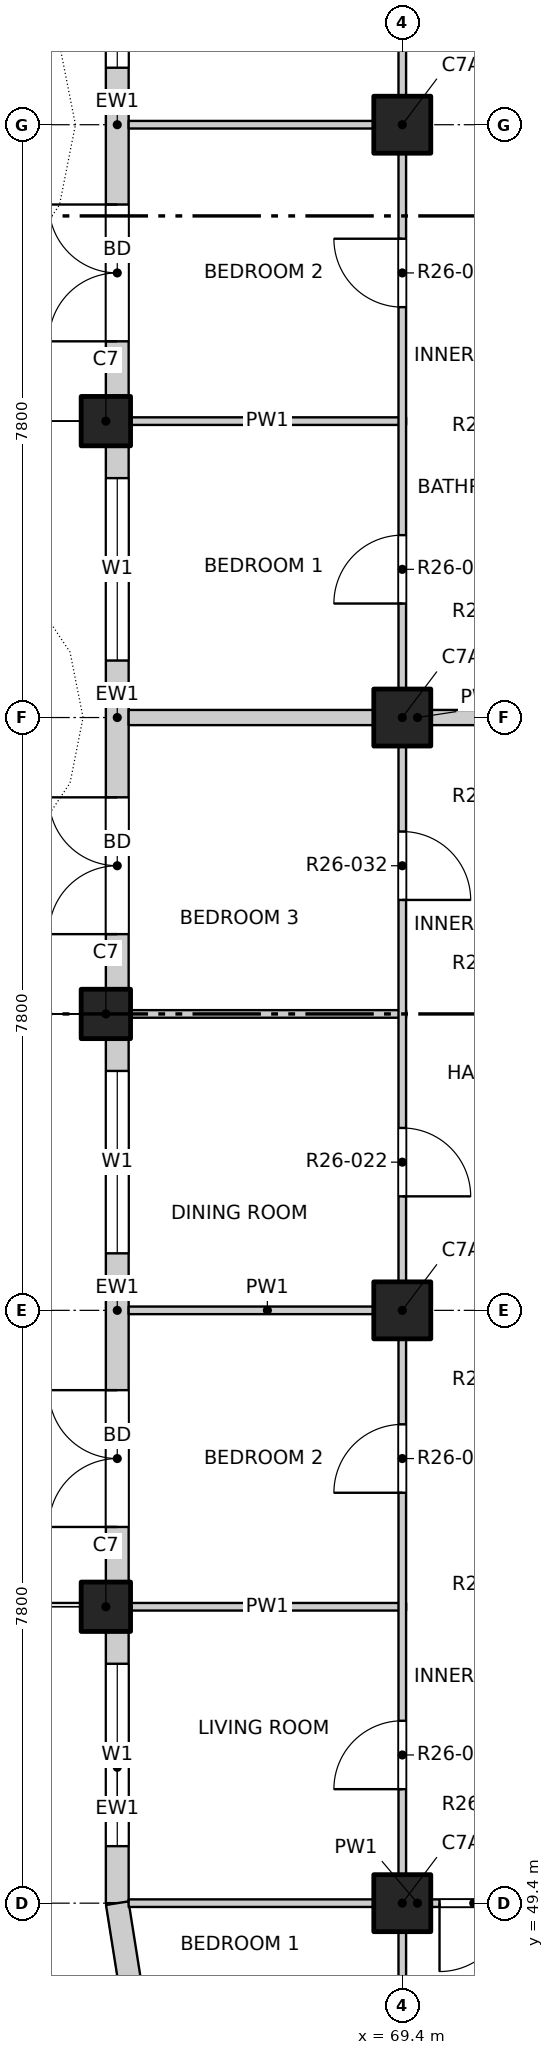
"""IFC4 building model, lengths in metres.
Left out: names, types, materials, properties, quantities, classifications, styles, units other than length and angle.
Written with IfcOpenShell. Run it as: python <this file> out.ifc"""

import sys

from ifc_helpers import new_model, si_unit, direction, frame, frame_2d, origin, origin_2d, place, context, subcontext, project, spatial, rectangle, extrude, element, fill, save


model = new_model("IFC4")
c1 = context("Model", 3, precision=1e-05, world=origin(), true_north=direction((0.0, 1.0)))
c2 = subcontext(c1, "Body", "Model", "MODEL_VIEW")
j1 = project(units=[si_unit("LENGTHUNIT", "METRE"), si_unit("PLANEANGLEUNIT", "RADIAN")], contexts=[c1])
p1 = place(None, origin())
s1 = spatial("IfcSite", under=j1, at=p1, CompositionType="ELEMENT")
p2 = place(p1, origin())
s2 = spatial("IfcBuilding", under=s1, at=p2, CompositionType="ELEMENT")
p3 = place(p2, frame((0.0, 0.0, 259.6)))
s3 = spatial("IfcBuildingStorey", under=s2, at=p3, CompositionType="ELEMENT", Elevation=259.6)
for number, where, z_axis, x_axis in (
    (1, (65.5, 53.3, -0.25), (0.0, 0.0, 1.0), (1.0, 0.0, 0.0)),
    (2, (65.5, 61.1, -0.25), (0.0, 0.0, 1.0), (1.0, 0.0, 0.0)),
    (3, (65.5, 68.9, -0.25), (0.0, 0.0, 1.0), (1.0, 0.0, 0.0)),
):
    element("IfcColumn", number, at=place(p3, frame(where, z_axis=z_axis, x_axis=x_axis)), inside=s3, PredefinedType="COLUMN", context=c2, shape_type="SweptSolid", body=[
        extrude(rectangle(XDim=0.65, YDim=0.65, at=origin_2d()), origin(), (0.0, 0.0, 1.0), 3.4),
    ])
for number, where, z_axis, x_axis in (
    (4, (69.4, 49.4, -0.25), (0.0, 0.0, 1.0), (1.0, 0.0, 0.0)),
    (5, (69.4, 57.2, -0.25), (0.0, 0.0, 1.0), (1.0, 0.0, 0.0)),
    (6, (69.4, 65.0, -0.25), (0.0, 0.0, 1.0), (1.0, 0.0, 0.0)),
    (7, (69.4, 72.8, -0.25), (0.0, 0.0, 1.0), (1.0, 0.0, 0.0)),
):
    element("IfcColumn", number, at=place(p3, frame(where, z_axis=z_axis, x_axis=x_axis)), inside=s3, PredefinedType="COLUMN", context=c2, shape_type="SweptSolid", body=[
        extrude(rectangle(XDim=0.75, YDim=0.75, at=origin_2d()), origin(), (0.0, 0.0, 1.0), 3.4),
    ])
p4 = place(p3, frame((65.65, 49.4, 0.0), z_axis=(0.0, 0.0, 1.0), x_axis=(0.0, 1.0, 0.0)))
e8 = element("IfcWall", 8, at=p4, inside=s3, PredefinedType="SOLIDWALL", context=c2, shape_type="SweptSolid", body=[
    extrude(rectangle(XDim=3.575, YDim=0.3, at=frame_2d((1.788, 0.0))), origin(), (0.0, 0.0, 1.0), 3.15),
])
p5 = place(p4, frame((0.75, 0.0, 0.9)))
e9 = element("IfcOpeningElement", 9, at=p5, cuts=e8, PredefinedType="OPENING", context=c2, shape_type="SweptSolid", body=[
    extrude(rectangle(XDim=2.4, YDim=1.8, at=frame_2d((1.2, 0.9))), frame((0.0, 0.16, 0.0), z_axis=(0.0, -1.0, 0.0), x_axis=(1.0, 0.0, 0.0)), (0.0, 0.0, 1.0), 0.32),
])
p6 = place(p3, frame((65.65, 53.625, 0.0), z_axis=(0.0, 0.0, 1.0), x_axis=(0.0, 1.0, 0.0)))
e10 = element("IfcWall", 10, at=p6, inside=s3, PredefinedType="SOLIDWALL", context=c2, shape_type="SweptSolid", body=[
    extrude(rectangle(XDim=7.15, YDim=0.3, at=frame_2d((3.575, 0.0))), origin(), (0.0, 0.0, 1.0), 3.15),
])
p7 = place(p6, frame((0.725, 0.0, 0.0)))
e11 = element("IfcOpeningElement", 11, at=p7, cuts=e10, PredefinedType="OPENING", context=c2, shape_type="SweptSolid", body=[
    extrude(rectangle(XDim=1.8, YDim=2.4, at=frame_2d((0.9, 1.2))), frame((0.0, 0.16, 0.0), z_axis=(0.0, -1.0, 0.0), x_axis=(1.0, 0.0, 0.0)), (0.0, 0.0, 1.0), 0.32),
])
p8 = place(p6, frame((4.325, 0.0, 0.9)))
e12 = element("IfcOpeningElement", 12, at=p8, cuts=e10, PredefinedType="OPENING", context=c2, shape_type="SweptSolid", body=[
    extrude(rectangle(XDim=2.4, YDim=1.8, at=frame_2d((1.2, 0.9))), frame((0.0, 0.16, 0.0), z_axis=(0.0, -1.0, 0.0), x_axis=(1.0, 0.0, 0.0)), (0.0, 0.0, 1.0), 0.32),
])
p9 = place(p3, frame((65.65, 61.425, 0.0), z_axis=(0.0, 0.0, 1.0), x_axis=(0.0, 1.0, 0.0)))
e13 = element("IfcWall", 13, at=p9, inside=s3, PredefinedType="SOLIDWALL", context=c2, shape_type="SweptSolid", body=[
    extrude(rectangle(XDim=7.15, YDim=0.3, at=frame_2d((3.575, 0.0))), origin(), (0.0, 0.0, 1.0), 3.15),
])
p10 = place(p9, frame((0.725, 0.0, 0.0)))
e14 = element("IfcOpeningElement", 14, at=p10, cuts=e13, PredefinedType="OPENING", context=c2, shape_type="SweptSolid", body=[
    extrude(rectangle(XDim=1.8, YDim=2.4, at=frame_2d((0.9, 1.2))), frame((0.0, 0.16, 0.0), z_axis=(0.0, -1.0, 0.0), x_axis=(1.0, 0.0, 0.0)), (0.0, 0.0, 1.0), 0.32),
])
p11 = place(p9, frame((4.325, 0.0, 0.9)))
e15 = element("IfcOpeningElement", 15, at=p11, cuts=e13, PredefinedType="OPENING", context=c2, shape_type="SweptSolid", body=[
    extrude(rectangle(XDim=2.4, YDim=1.8, at=frame_2d((1.2, 0.9))), frame((0.0, 0.16, 0.0), z_axis=(0.0, -1.0, 0.0), x_axis=(1.0, 0.0, 0.0)), (0.0, 0.0, 1.0), 0.32),
])
p12 = place(p3, frame((65.65, 69.225, 0.0), z_axis=(0.0, 0.0, 1.0), x_axis=(0.0, 1.0, 0.0)))
e16 = element("IfcWall", 16, at=p12, inside=s3, PredefinedType="SOLIDWALL", context=c2, shape_type="SweptSolid", body=[
    extrude(rectangle(XDim=7.15, YDim=0.3, at=frame_2d((3.575, 0.0))), origin(), (0.0, 0.0, 1.0), 3.15),
])
p13 = place(p12, frame((0.725, 0.0, 0.0)))
e17 = element("IfcOpeningElement", 17, at=p13, cuts=e16, PredefinedType="OPENING", context=c2, shape_type="SweptSolid", body=[
    extrude(rectangle(XDim=1.8, YDim=2.4, at=frame_2d((0.9, 1.2))), frame((0.0, 0.16, 0.0), z_axis=(0.0, -1.0, 0.0), x_axis=(1.0, 0.0, 0.0)), (0.0, 0.0, 1.0), 0.32),
])
p14 = place(p12, frame((4.325, 0.0, 0.9)))
e18 = element("IfcOpeningElement", 18, at=p14, cuts=e16, PredefinedType="OPENING", context=c2, shape_type="SweptSolid", body=[
    extrude(rectangle(XDim=2.4, YDim=1.8, at=frame_2d((1.2, 0.9))), frame((0.0, 0.16, 0.0), z_axis=(0.0, -1.0, 0.0), x_axis=(1.0, 0.0, 0.0)), (0.0, 0.0, 1.0), 0.32),
])
p15 = place(p3, frame((65.65, 49.4, 0.0), z_axis=(0.0, 0.0, 1.0), x_axis=(0.156496880861, -0.987678452879, 0.0)))
e19 = element("IfcWall", 19, at=p15, inside=s3, PredefinedType="SOLIDWALL", context=c2, shape_type="SweptSolid", body=[
    extrude(rectangle(XDim=1.173, YDim=0.3, at=frame_2d((0.586, 0.0))), origin(), (0.0, 0.0, 1.0), 3.15),
])
p16 = place(p3, frame((65.8, 49.4, 0.0), z_axis=(0.0, 0.0, 1.0), x_axis=(1.0, 0.0, 0.0)))
e20 = element("IfcWall", 20, at=p16, inside=s3, PredefinedType="PARTITIONING", context=c2, shape_type="SweptSolid", body=[
    extrude(rectangle(XDim=7.6, YDim=0.1, at=frame_2d((3.8, 0.0))), origin(), (0.0, 0.0, 1.0), 3.15),
])
p17 = place(p16, frame((4.09, 0.0, 0.0)))
e21 = element("IfcOpeningElement", 21, at=p17, cuts=e20, PredefinedType="OPENING", context=c2, shape_type="SweptSolid", body=[
    extrude(rectangle(XDim=0.9, YDim=2.1, at=frame_2d((0.45, 1.05))), frame((0.0, 0.06, 0.0), z_axis=(0.0, -1.0, 0.0), x_axis=(1.0, 0.0, 0.0)), (0.0, 0.0, 1.0), 0.12),
])
for number, where, z_axis, x_axis in (
    (22, (65.8, 53.3, 0.0), (0.0, 0.0, 1.0), (1.0, 0.0, 0.0)),
    (23, (65.8, 57.2, 0.0), (0.0, 0.0, 1.0), (1.0, 0.0, 0.0)),
    (24, (65.8, 61.1, 0.0), (0.0, 0.0, 1.0), (1.0, 0.0, 0.0)),
):
    element("IfcWall", number, at=place(p3, frame(where, z_axis=z_axis, x_axis=x_axis)), inside=s3, PredefinedType="PARTITIONING", context=c2, shape_type="SweptSolid", body=[
        extrude(rectangle(XDim=3.65, YDim=0.1, at=frame_2d((1.825, 0.0))), origin(), (0.0, 0.0, 1.0), 3.15),
    ])
p18 = place(p3, frame((65.8, 65.0, 0.0), z_axis=(0.0, 0.0, 1.0), x_axis=(1.0, 0.0, 0.0)))
e25 = element("IfcWall", 25, at=p18, inside=s3, PredefinedType="PARTITIONING", context=c2, shape_type="SweptSolid", body=[
    extrude(rectangle(XDim=7.6, YDim=0.2, at=frame_2d((3.8, 0.0))), origin(), (0.0, 0.0, 1.0), 3.15),
])
for number, where, z_axis, x_axis in (
    (26, (65.8, 68.9, 0.0), (0.0, 0.0, 1.0), (1.0, 0.0, 0.0)),
    (27, (65.8, 72.8, 0.0), (0.0, 0.0, 1.0), (1.0, 0.0, 0.0)),
):
    element("IfcWall", number, at=place(p3, frame(where, z_axis=z_axis, x_axis=x_axis)), inside=s3, PredefinedType="PARTITIONING", context=c2, shape_type="SweptSolid", body=[
        extrude(rectangle(XDim=3.65, YDim=0.1, at=frame_2d((1.825, 0.0))), origin(), (0.0, 0.0, 1.0), 3.15),
    ])
p19 = place(p3, frame((69.4, 45.8, 0.0), z_axis=(0.0, 0.0, 1.0), x_axis=(0.0, 1.0, 0.0)))
e28 = element("IfcWall", 28, at=p19, inside=s3, PredefinedType="PARTITIONING", context=c2, shape_type="SweptSolid", body=[
    extrude(rectangle(XDim=38.4, YDim=0.1, at=frame_2d((19.2, 0.0))), origin(), (0.0, 0.0, 1.0), 3.15),
])
p20 = place(p19, frame((1.05, 0.0, 0.0)))
e29 = element("IfcOpeningElement", 29, at=p20, cuts=e28, PredefinedType="OPENING", context=c2, shape_type="SweptSolid", body=[
    extrude(rectangle(XDim=1.2, YDim=2.1, at=frame_2d((0.6, 1.05))), frame((0.0, 0.06, 0.0), z_axis=(0.0, -1.0, 0.0), x_axis=(1.0, 0.0, 0.0)), (0.0, 0.0, 1.0), 0.12),
])
p21 = place(p19, frame((5.1, 0.0, 0.0)))
e30 = element("IfcOpeningElement", 30, at=p21, cuts=e28, PredefinedType="OPENING", context=c2, shape_type="SweptSolid", body=[
    extrude(rectangle(XDim=0.9, YDim=2.1, at=frame_2d((0.45, 1.05))), frame((0.0, 0.06, 0.0), z_axis=(0.0, -1.0, 0.0), x_axis=(1.0, 0.0, 0.0)), (0.0, 0.0, 1.0), 0.12),
])
p22 = place(p19, frame((9.0, 0.0, 0.0)))
e31 = element("IfcOpeningElement", 31, at=p22, cuts=e28, PredefinedType="OPENING", context=c2, shape_type="SweptSolid", body=[
    extrude(rectangle(XDim=0.9, YDim=2.1, at=frame_2d((0.45, 1.05))), frame((0.0, 0.06, 0.0), z_axis=(0.0, -1.0, 0.0), x_axis=(1.0, 0.0, 0.0)), (0.0, 0.0, 1.0), 0.12),
])
p23 = place(p19, frame((12.9, 0.0, 0.0)))
e32 = element("IfcOpeningElement", 32, at=p23, cuts=e28, PredefinedType="OPENING", context=c2, shape_type="SweptSolid", body=[
    extrude(rectangle(XDim=0.9, YDim=2.1, at=frame_2d((0.45, 1.05))), frame((0.0, 0.06, 0.0), z_axis=(0.0, -1.0, 0.0), x_axis=(1.0, 0.0, 0.0)), (0.0, 0.0, 1.0), 0.12),
])
p24 = place(p19, frame((16.8, 0.0, 0.0)))
e33 = element("IfcOpeningElement", 33, at=p24, cuts=e28, PredefinedType="OPENING", context=c2, shape_type="SweptSolid", body=[
    extrude(rectangle(XDim=0.9, YDim=2.1, at=frame_2d((0.45, 1.05))), frame((0.0, 0.06, 0.0), z_axis=(0.0, -1.0, 0.0), x_axis=(1.0, 0.0, 0.0)), (0.0, 0.0, 1.0), 0.12),
])
p25 = place(p19, frame((20.7, 0.0, 0.0)))
e34 = element("IfcOpeningElement", 34, at=p25, cuts=e28, PredefinedType="OPENING", context=c2, shape_type="SweptSolid", body=[
    extrude(rectangle(XDim=0.9, YDim=2.1, at=frame_2d((0.45, 1.05))), frame((0.0, 0.06, 0.0), z_axis=(0.0, -1.0, 0.0), x_axis=(1.0, 0.0, 0.0)), (0.0, 0.0, 1.0), 0.12),
])
p26 = place(p19, frame((24.6, 0.0, 0.0)))
e35 = element("IfcOpeningElement", 35, at=p26, cuts=e28, PredefinedType="OPENING", context=c2, shape_type="SweptSolid", body=[
    extrude(rectangle(XDim=0.9, YDim=2.1, at=frame_2d((0.45, 1.05))), frame((0.0, 0.06, 0.0), z_axis=(0.0, -1.0, 0.0), x_axis=(1.0, 0.0, 0.0)), (0.0, 0.0, 1.0), 0.12),
])
p27 = place(p19, frame((30.3, 0.0, 0.0)))
e36 = element("IfcOpeningElement", 36, at=p27, cuts=e28, PredefinedType="OPENING", context=c2, shape_type="SweptSolid", body=[
    extrude(rectangle(XDim=1.2, YDim=2.1, at=frame_2d((0.6, 1.05))), frame((0.0, 0.06, 0.0), z_axis=(0.0, -1.0, 0.0), x_axis=(1.0, 0.0, 0.0)), (0.0, 0.0, 1.0), 0.12),
])
p28 = place(p19, frame((36.15, 0.0, 0.0)))
e37 = element("IfcOpeningElement", 37, at=p28, cuts=e28, PredefinedType="OPENING", context=c2, shape_type="SweptSolid", body=[
    extrude(rectangle(XDim=1.2, YDim=2.1, at=frame_2d((0.6, 1.05))), frame((0.0, 0.06, 0.0), z_axis=(0.0, -1.0, 0.0), x_axis=(1.0, 0.0, 0.0)), (0.0, 0.0, 1.0), 0.12),
])
p29 = place(p5, origin())
e38 = element("IfcWindow", 38, at=p29, inside=s3, PartitioningType="DOUBLE_PANEL_VERTICAL", PredefinedType="WINDOW", context=c2, shape_type="SweptSolid", body=[
    extrude(rectangle(XDim=2.4, YDim=1.8, at=frame_2d((1.2, 0.9))), frame((0.0, 0.03, 0.0), z_axis=(0.0, -1.0, 0.0), x_axis=(1.0, 0.0, 0.0)), (0.0, 0.0, 1.0), 0.06),
])
fill(e9, e38)
p30 = place(p7, origin())
e39 = element("IfcDoor", 39, at=p30, inside=s3, OperationType="DOUBLE_DOOR_SINGLE_SWING", PredefinedType="DOOR", context=c2, shape_type="SweptSolid", body=[
    extrude(rectangle(XDim=1.8, YDim=2.4, at=frame_2d((0.9, 1.2))), frame((0.0, 0.025, 0.0), z_axis=(0.0, -1.0, 0.0), x_axis=(1.0, 0.0, 0.0)), (0.0, 0.0, 1.0), 0.05),
])
fill(e11, e39)
p31 = place(p8, origin())
e40 = element("IfcWindow", 40, at=p31, inside=s3, PartitioningType="DOUBLE_PANEL_VERTICAL", PredefinedType="WINDOW", context=c2, shape_type="SweptSolid", body=[
    extrude(rectangle(XDim=2.4, YDim=1.8, at=frame_2d((1.2, 0.9))), frame((0.0, 0.03, 0.0), z_axis=(0.0, -1.0, 0.0), x_axis=(1.0, 0.0, 0.0)), (0.0, 0.0, 1.0), 0.06),
])
fill(e12, e40)
p32 = place(p10, origin())
e41 = element("IfcDoor", 41, at=p32, inside=s3, OperationType="DOUBLE_DOOR_SINGLE_SWING", PredefinedType="DOOR", context=c2, shape_type="SweptSolid", body=[
    extrude(rectangle(XDim=1.8, YDim=2.4, at=frame_2d((0.9, 1.2))), frame((0.0, 0.025, 0.0), z_axis=(0.0, -1.0, 0.0), x_axis=(1.0, 0.0, 0.0)), (0.0, 0.0, 1.0), 0.05),
])
fill(e14, e41)
p33 = place(p11, origin())
e42 = element("IfcWindow", 42, at=p33, inside=s3, PartitioningType="DOUBLE_PANEL_VERTICAL", PredefinedType="WINDOW", context=c2, shape_type="SweptSolid", body=[
    extrude(rectangle(XDim=2.4, YDim=1.8, at=frame_2d((1.2, 0.9))), frame((0.0, 0.03, 0.0), z_axis=(0.0, -1.0, 0.0), x_axis=(1.0, 0.0, 0.0)), (0.0, 0.0, 1.0), 0.06),
])
fill(e15, e42)
p34 = place(p13, origin())
e43 = element("IfcDoor", 43, at=p34, inside=s3, OperationType="DOUBLE_DOOR_SINGLE_SWING", PredefinedType="DOOR", context=c2, shape_type="SweptSolid", body=[
    extrude(rectangle(XDim=1.8, YDim=2.4, at=frame_2d((0.9, 1.2))), frame((0.0, 0.025, 0.0), z_axis=(0.0, -1.0, 0.0), x_axis=(1.0, 0.0, 0.0)), (0.0, 0.0, 1.0), 0.05),
])
fill(e17, e43)
p35 = place(p14, origin())
e44 = element("IfcWindow", 44, at=p35, inside=s3, PartitioningType="DOUBLE_PANEL_VERTICAL", PredefinedType="WINDOW", context=c2, shape_type="SweptSolid", body=[
    extrude(rectangle(XDim=2.4, YDim=1.8, at=frame_2d((1.2, 0.9))), frame((0.0, 0.03, 0.0), z_axis=(0.0, -1.0, 0.0), x_axis=(1.0, 0.0, 0.0)), (0.0, 0.0, 1.0), 0.06),
])
fill(e18, e44)
p36 = place(p17, origin())
e45 = element("IfcDoor", 45, at=p36, inside=s3, OperationType="SINGLE_SWING_RIGHT", PredefinedType="DOOR", context=c2, shape_type="SweptSolid", body=[
    extrude(rectangle(XDim=0.9, YDim=2.1, at=frame_2d((0.45, 1.05))), frame((0.0, 0.025, 0.0), z_axis=(0.0, -1.0, 0.0), x_axis=(1.0, 0.0, 0.0)), (0.0, 0.0, 1.0), 0.05),
])
fill(e21, e45)
p37 = place(p21, origin())
e46 = element("IfcDoor", 46, at=p37, inside=s3, OperationType="SINGLE_SWING_LEFT", PredefinedType="DOOR", context=c2, shape_type="SweptSolid", body=[
    extrude(rectangle(XDim=0.9, YDim=2.1, at=frame_2d((0.45, 1.05))), frame((0.0, 0.025, 0.0), z_axis=(0.0, -1.0, 0.0), x_axis=(1.0, 0.0, 0.0)), (0.0, 0.0, 1.0), 0.05),
])
fill(e30, e46)
p38 = place(p22, origin())
e47 = element("IfcDoor", 47, at=p38, inside=s3, OperationType="SINGLE_SWING_LEFT", PredefinedType="DOOR", context=c2, shape_type="SweptSolid", body=[
    extrude(rectangle(XDim=0.9, YDim=2.1, at=frame_2d((0.45, 1.05))), frame((0.0, 0.025, 0.0), z_axis=(0.0, -1.0, 0.0), x_axis=(1.0, 0.0, 0.0)), (0.0, 0.0, 1.0), 0.05),
])
fill(e31, e47)
p39 = place(p23, origin())
e48 = element("IfcDoor", 48, at=p39, inside=s3, OperationType="SINGLE_SWING_RIGHT", PredefinedType="DOOR", context=c2, shape_type="SweptSolid", body=[
    extrude(rectangle(XDim=0.9, YDim=2.1, at=frame_2d((0.45, 1.05))), frame((0.0, 0.025, 0.0), z_axis=(0.0, -1.0, 0.0), x_axis=(1.0, 0.0, 0.0)), (0.0, 0.0, 1.0), 0.05),
])
fill(e32, e48)
p40 = place(p24, origin())
e49 = element("IfcDoor", 49, at=p40, inside=s3, OperationType="SINGLE_SWING_RIGHT", PredefinedType="DOOR", context=c2, shape_type="SweptSolid", body=[
    extrude(rectangle(XDim=0.9, YDim=2.1, at=frame_2d((0.45, 1.05))), frame((0.0, 0.025, 0.0), z_axis=(0.0, -1.0, 0.0), x_axis=(1.0, 0.0, 0.0)), (0.0, 0.0, 1.0), 0.05),
])
fill(e33, e49)
p41 = place(p25, origin())
e50 = element("IfcDoor", 50, at=p41, inside=s3, OperationType="SINGLE_SWING_LEFT", PredefinedType="DOOR", context=c2, shape_type="SweptSolid", body=[
    extrude(rectangle(XDim=0.9, YDim=2.1, at=frame_2d((0.45, 1.05))), frame((0.0, 0.025, 0.0), z_axis=(0.0, -1.0, 0.0), x_axis=(1.0, 0.0, 0.0)), (0.0, 0.0, 1.0), 0.05),
])
fill(e34, e50)
p42 = place(p26, origin())
e51 = element("IfcDoor", 51, at=p42, inside=s3, OperationType="SINGLE_SWING_RIGHT", PredefinedType="DOOR", context=c2, shape_type="SweptSolid", body=[
    extrude(rectangle(XDim=0.9, YDim=2.1, at=frame_2d((0.45, 1.05))), frame((0.0, 0.025, 0.0), z_axis=(0.0, -1.0, 0.0), x_axis=(1.0, 0.0, 0.0)), (0.0, 0.0, 1.0), 0.05),
])
fill(e35, e51)
save(model, sys.argv[1])
